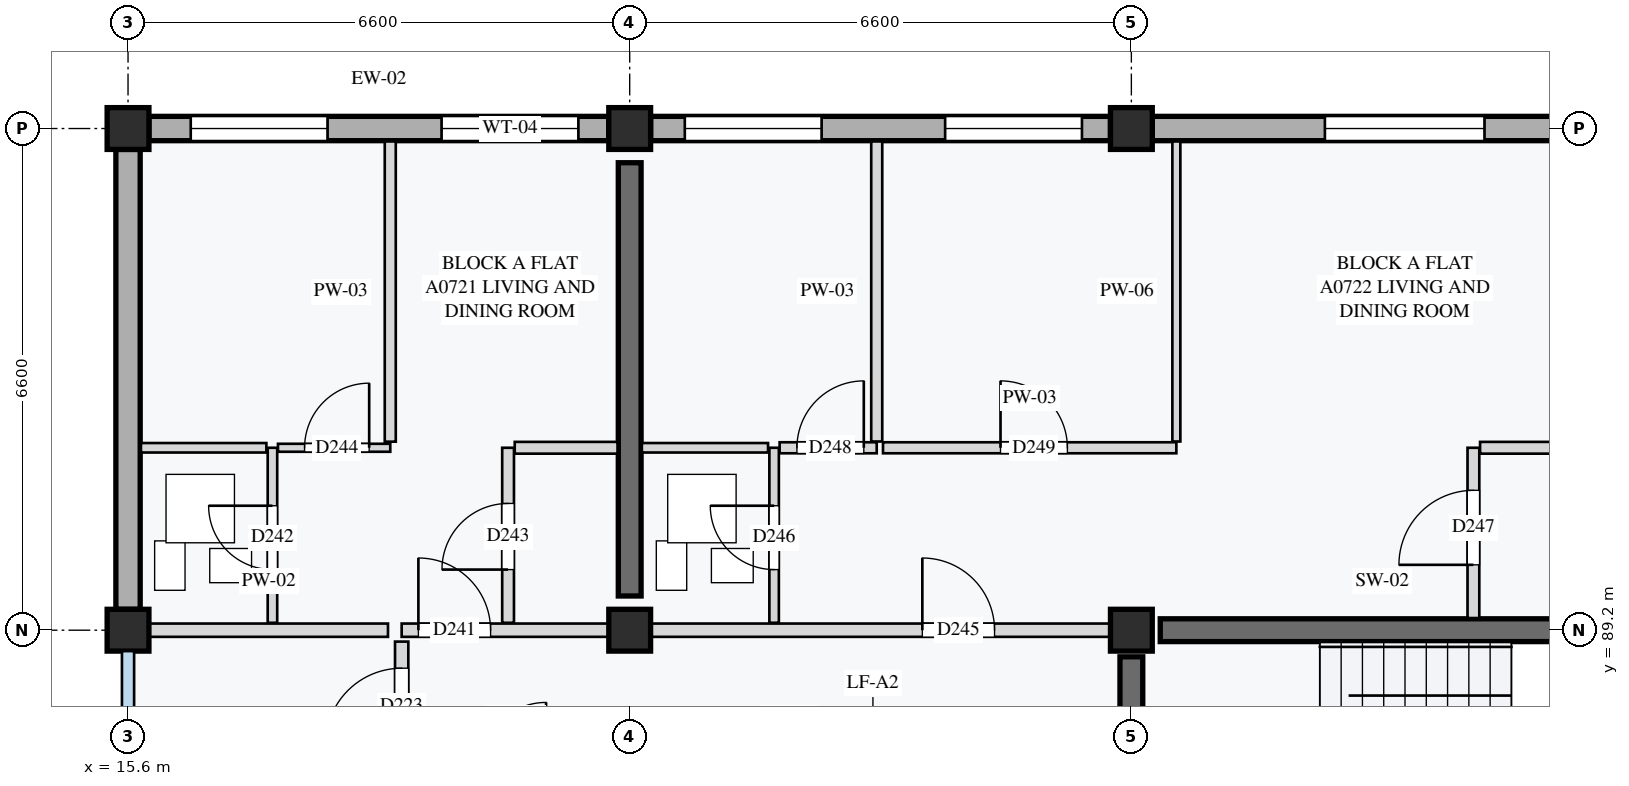
"""IFC4 building model, lengths in metres.
Left out: names, types, materials, properties, quantities, classifications, styles, units other than length and angle.
Written with IfcOpenShell. Run it as: python <this file> out.ifc"""

import sys

from ifc_helpers import new_model, si_unit, direction, frame, frame_2d, origin, origin_2d, place, context, subcontext, project, spatial, rectangle, extrude, element, fill, save


model = new_model("IFC4")
c1 = context("Model", 3, precision=1e-05, world=origin(), true_north=direction((0.0, 1.0)))
c2 = subcontext(c1, "Body", "Model", "MODEL_VIEW")
j1 = project(units=[si_unit("LENGTHUNIT", "METRE"), si_unit("PLANEANGLEUNIT", "RADIAN")], contexts=[c1])
p1 = place(None, origin())
s1 = spatial("IfcSite", under=j1, at=p1, CompositionType="ELEMENT")
p2 = place(p1, origin())
s2 = spatial("IfcBuilding", under=s1, at=p2, CompositionType="ELEMENT")
p3 = place(p2, frame((0.0, 0.0, 24.4)))
s3 = spatial("IfcBuildingStorey", under=s2, at=p3, CompositionType="ELEMENT", Elevation=24.4)
for number, where, z_axis, x_axis in (
    (1, (15.6, 89.2, 0.0), (0.0, 0.0, 1.0), (1.0, 0.0, 0.0)),
    (2, (15.6, 95.8, 0.0), (0.0, 0.0, 1.0), (1.0, 0.0, 0.0)),
    (3, (22.2, 89.2, 0.0), (0.0, 0.0, 1.0), (1.0, 0.0, 0.0)),
    (4, (22.2, 95.8, 0.0), (0.0, 0.0, 1.0), (1.0, 0.0, 0.0)),
    (5, (28.8, 89.2, 0.0), (0.0, 0.0, 1.0), (1.0, 0.0, 0.0)),
    (6, (28.8, 95.8, 0.0), (0.0, 0.0, 1.0), (1.0, 0.0, 0.0)),
):
    element("IfcColumn", number, at=place(p3, frame(where, z_axis=z_axis, x_axis=x_axis)), inside=s3, PredefinedType="COLUMN", context=c2, shape_type="SweptSolid", body=[
        extrude(rectangle(XDim=0.55, YDim=0.55, at=origin_2d()), origin(), (0.0, 0.0, 1.0), 3.2),
    ])
p4 = place(p3, frame((29.18, 89.2, 0.0), z_axis=(0.0, 0.0, 1.0), x_axis=(1.0, 0.0, 0.0)))
e7 = element("IfcWall", 7, at=p4, inside=s3, PredefinedType="SHEAR", context=c2, shape_type="SweptSolid", body=[
    extrude(rectangle(XDim=5.84, YDim=0.3, at=frame_2d((2.92, 0.0))), origin(), (0.0, 0.0, 1.0), 2.97),
])
p5 = place(p3, frame((28.8, 86.05, 0.0), z_axis=(0.0, 0.0, 1.0), x_axis=(0.0, 1.0, 0.0)))
e8 = element("IfcWall", 8, at=p5, inside=s3, PredefinedType="SHEAR", context=c2, shape_type="SweptSolid", body=[
    extrude(rectangle(XDim=2.8, YDim=0.3, at=frame_2d((1.4, 0.0))), origin(), (0.0, 0.0, 1.0), 2.97),
])
p6 = place(p3, frame((22.2, 89.65, 0.0), z_axis=(0.0, 0.0, 1.0), x_axis=(0.0, 1.0, 0.0)))
e9 = element("IfcWall", 9, at=p6, inside=s3, PredefinedType="SHEAR", context=c2, shape_type="SweptSolid", body=[
    extrude(rectangle(XDim=5.7, YDim=0.3, at=frame_2d((2.85, 0.0))), origin(), (0.0, 0.0, 1.0), 2.97),
])
p7 = place(p3, frame((15.875, 95.8, 0.0), z_axis=(0.0, 0.0, 1.0), x_axis=(1.0, 0.0, 0.0)))
e10 = element("IfcWall", 10, at=p7, inside=s3, PredefinedType="STANDARD", context=c2, shape_type="SweptSolid", body=[
    extrude(rectangle(XDim=6.05, YDim=0.32, at=frame_2d((3.025, 0.0))), origin(), (0.0, 0.0, 1.0), 2.6),
])
p8 = place(p7, frame((0.55, 0.0, 0.85)))
e11 = element("IfcOpeningElement", 11, at=p8, cuts=e10, PredefinedType="OPENING", context=c2, shape_type="SweptSolid", body=[
    extrude(rectangle(XDim=1.8, YDim=1.35, at=frame_2d((0.9, 0.675))), frame((0.0, 0.17, 0.0), z_axis=(0.0, -1.0, 0.0), x_axis=(1.0, 0.0, 0.0)), (0.0, 0.0, 1.0), 0.34),
])
p9 = place(p7, frame((3.85, 0.0, 0.85)))
e12 = element("IfcOpeningElement", 12, at=p9, cuts=e10, PredefinedType="OPENING", context=c2, shape_type="SweptSolid", body=[
    extrude(rectangle(XDim=1.8, YDim=1.55, at=frame_2d((0.9, 0.775))), frame((0.0, 0.17, 0.0), z_axis=(0.0, -1.0, 0.0), x_axis=(1.0, 0.0, 0.0)), (0.0, 0.0, 1.0), 0.34),
])
p10 = place(p3, frame((22.475, 95.8, 0.0), z_axis=(0.0, 0.0, 1.0), x_axis=(1.0, 0.0, 0.0)))
e13 = element("IfcWall", 13, at=p10, inside=s3, PredefinedType="STANDARD", context=c2, shape_type="SweptSolid", body=[
    extrude(rectangle(XDim=6.05, YDim=0.32, at=frame_2d((3.025, 0.0))), origin(), (0.0, 0.0, 1.0), 2.6),
])
p11 = place(p10, frame((0.45, 0.0, 0.85)))
e14 = element("IfcOpeningElement", 14, at=p11, cuts=e13, PredefinedType="OPENING", context=c2, shape_type="SweptSolid", body=[
    extrude(rectangle(XDim=1.8, YDim=1.35, at=frame_2d((0.9, 0.675))), frame((0.0, 0.17, 0.0), z_axis=(0.0, -1.0, 0.0), x_axis=(1.0, 0.0, 0.0)), (0.0, 0.0, 1.0), 0.34),
])
p12 = place(p10, frame((3.875, 0.0, 0.85)))
e15 = element("IfcOpeningElement", 15, at=p12, cuts=e13, PredefinedType="OPENING", context=c2, shape_type="SweptSolid", body=[
    extrude(rectangle(XDim=1.8, YDim=1.35, at=frame_2d((0.9, 0.675))), frame((0.0, 0.17, 0.0), z_axis=(0.0, -1.0, 0.0), x_axis=(1.0, 0.0, 0.0)), (0.0, 0.0, 1.0), 0.34),
])
p13 = place(p3, frame((29.075, 95.8, 0.0), z_axis=(0.0, 0.0, 1.0), x_axis=(1.0, 0.0, 0.0)))
e16 = element("IfcWall", 16, at=p13, inside=s3, PredefinedType="STANDARD", context=c2, shape_type="SweptSolid", body=[
    extrude(rectangle(XDim=6.05, YDim=0.32, at=frame_2d((3.025, 0.0))), origin(), (0.0, 0.0, 1.0), 2.6),
])
p14 = place(p13, frame((2.271, 0.0, 0.85)))
e17 = element("IfcOpeningElement", 17, at=p14, cuts=e16, PredefinedType="OPENING", context=c2, shape_type="SweptSolid", body=[
    extrude(rectangle(XDim=2.1, YDim=1.55, at=frame_2d((1.05, 0.775))), frame((0.0, 0.17, 0.0), z_axis=(0.0, -1.0, 0.0), x_axis=(1.0, 0.0, 0.0)), (0.0, 0.0, 1.0), 0.34),
])
p15 = place(p3, frame((15.6, 89.475, 0.0), z_axis=(0.0, 0.0, 1.0), x_axis=(0.0, 1.0, 0.0)))
e18 = element("IfcWall", 18, at=p15, inside=s3, PredefinedType="STANDARD", context=c2, shape_type="SweptSolid", body=[
    extrude(rectangle(XDim=6.05, YDim=0.32, at=frame_2d((3.025, 0.0))), origin(), (0.0, 0.0, 1.0), 2.65),
])
p16 = place(p3, frame((19.2, 86.05, 0.0), z_axis=(0.0, 0.0, 1.0), x_axis=(0.0, 1.0, 0.0)))
e19 = element("IfcWall", 19, at=p16, inside=s3, PredefinedType="PARTITIONING", context=c2, shape_type="SweptSolid", body=[
    extrude(rectangle(XDim=3.0, YDim=0.175, at=frame_2d((1.5, 0.0))), origin(), (0.0, 0.0, 1.0), 2.97),
])
p17 = place(p16, frame((1.65, 0.0, 0.0)))
e20 = element("IfcOpeningElement", 20, at=p17, cuts=e19, PredefinedType="OPENING", context=c2, shape_type="SweptSolid", body=[
    extrude(rectangle(XDim=1.0, YDim=2.16, at=frame_2d((0.5, 1.08))), frame((0.0, 0.097, 0.0), z_axis=(0.0, -1.0, 0.0), x_axis=(1.0, 0.0, 0.0)), (0.0, 0.0, 1.0), 0.195),
])
p18 = place(p3, frame((15.88, 89.2, 0.0), z_axis=(0.0, 0.0, 1.0), x_axis=(1.0, 0.0, 0.0)))
e21 = element("IfcWall", 21, at=p18, inside=s3, PredefinedType="PARTITIONING", context=c2, shape_type="SweptSolid", body=[
    extrude(rectangle(XDim=3.14, YDim=0.175, at=frame_2d((1.57, 0.0))), origin(), (0.0, 0.0, 1.0), 2.7),
])
p19 = place(p3, frame((19.2, 89.2, 0.0), z_axis=(0.0, 0.0, 1.0), x_axis=(1.0, 0.0, 0.0)))
e22 = element("IfcWall", 22, at=p19, inside=s3, PredefinedType="PARTITIONING", context=c2, shape_type="SweptSolid", body=[
    extrude(rectangle(XDim=3.0, YDim=0.175, at=frame_2d((1.5, 0.0))), origin(), (0.0, 0.0, 1.0), 2.7),
])
p20 = place(p19, frame((0.22, 0.0, 0.0)))
e23 = element("IfcOpeningElement", 23, at=p20, cuts=e22, PredefinedType="OPENING", context=c2, shape_type="SweptSolid", body=[
    extrude(rectangle(XDim=0.95, YDim=2.16, at=frame_2d((0.475, 1.08))), frame((0.0, 0.097, 0.0), z_axis=(0.0, -1.0, 0.0), x_axis=(1.0, 0.0, 0.0)), (0.0, 0.0, 1.0), 0.195),
])
p21 = place(p3, frame((17.5, 89.298, 0.0), z_axis=(0.0, 0.0, 1.0), x_axis=(0.0, 1.0, 0.0)))
e24 = element("IfcWall", 24, at=p21, inside=s3, PredefinedType="PARTITIONING", context=c2, shape_type="SweptSolid", body=[
    extrude(rectangle(XDim=2.302, YDim=0.125, at=frame_2d((1.151, 0.0))), origin(), (0.0, 0.0, 1.0), 2.97),
])
p22 = place(p21, frame((0.7, 0.0, 0.0)))
e25 = element("IfcOpeningElement", 25, at=p22, cuts=e24, PredefinedType="OPENING", context=c2, shape_type="SweptSolid", body=[
    extrude(rectangle(XDim=0.84, YDim=2.06, at=frame_2d((0.42, 1.03))), frame((0.0, 0.073, 0.0), z_axis=(0.0, -1.0, 0.0), x_axis=(1.0, 0.0, 0.0)), (0.0, 0.0, 1.0), 0.145),
])
p23 = place(p3, frame((15.77, 91.6, 0.0), z_axis=(0.0, 0.0, 1.0), x_axis=(1.0, 0.0, 0.0)))
e26 = element("IfcWall", 26, at=p23, inside=s3, PredefinedType="PARTITIONING", context=c2, shape_type="SweptSolid", body=[
    extrude(rectangle(XDim=1.65, YDim=0.125, at=frame_2d((0.825, 0.0))), origin(), (0.0, 0.0, 1.0), 2.97),
])
p24 = place(p3, frame((20.6, 89.298, 0.0), z_axis=(0.0, 0.0, 1.0), x_axis=(0.0, 1.0, 0.0)))
e27 = element("IfcWall", 27, at=p24, inside=s3, PredefinedType="PARTITIONING", context=c2, shape_type="SweptSolid", body=[
    extrude(rectangle(XDim=2.302, YDim=0.155, at=frame_2d((1.151, 0.0))), origin(), (0.0, 0.0, 1.0), 2.97),
])
p25 = place(p24, frame((0.7, 0.0, 0.0)))
e28 = element("IfcOpeningElement", 28, at=p25, cuts=e27, PredefinedType="OPENING", context=c2, shape_type="SweptSolid", body=[
    extrude(rectangle(XDim=0.87, YDim=2.08, at=frame_2d((0.435, 1.04))), frame((0.0, 0.087, 0.0), z_axis=(0.0, -1.0, 0.0), x_axis=(1.0, 0.0, 0.0)), (0.0, 0.0, 1.0), 0.175),
])
p26 = place(p3, frame((20.688, 91.6, 0.0), z_axis=(0.0, 0.0, 1.0), x_axis=(1.0, 0.0, 0.0)))
e29 = element("IfcWall", 29, at=p26, inside=s3, PredefinedType="PARTITIONING", context=c2, shape_type="SweptSolid", body=[
    extrude(rectangle(XDim=1.353, YDim=0.155, at=frame_2d((0.676, 0.0))), origin(), (0.0, 0.0, 1.0), 2.97),
])
p27 = place(p3, frame((17.573, 91.6, 0.0), z_axis=(0.0, 0.0, 1.0), x_axis=(1.0, 0.0, 0.0)))
e30 = element("IfcWall", 30, at=p27, inside=s3, PredefinedType="PARTITIONING", context=c2, shape_type="SweptSolid", body=[
    extrude(rectangle(XDim=1.478, YDim=0.105, at=frame_2d((0.739, 0.0))), origin(), (0.0, 0.0, 1.0), 2.97),
])
p28 = place(p27, frame((0.35, 0.0, 0.0)))
e31 = element("IfcOpeningElement", 31, at=p28, cuts=e30, PredefinedType="OPENING", context=c2, shape_type="SweptSolid", body=[
    extrude(rectangle(XDim=0.85, YDim=2.1, at=frame_2d((0.425, 1.05))), frame((0.0, 0.062, 0.0), z_axis=(0.0, -1.0, 0.0), x_axis=(1.0, 0.0, 0.0)), (0.0, 0.0, 1.0), 0.125),
])
p29 = place(p3, frame((19.05, 91.68, 0.0), z_axis=(0.0, 0.0, 1.0), x_axis=(0.0, 1.0, 0.0)))
e32 = element("IfcWall", 32, at=p29, inside=s3, PredefinedType="PARTITIONING", context=c2, shape_type="SweptSolid", body=[
    extrude(rectangle(XDim=3.95, YDim=0.145, at=frame_2d((1.975, 0.0))), origin(), (0.0, 0.0, 1.0), 2.97),
])
p30 = place(p3, frame((22.2, 89.2, 0.0), z_axis=(0.0, 0.0, 1.0), x_axis=(1.0, 0.0, 0.0)))
e33 = element("IfcWall", 33, at=p30, inside=s3, PredefinedType="PARTITIONING", context=c2, shape_type="SweptSolid", body=[
    extrude(rectangle(XDim=6.6, YDim=0.175, at=frame_2d((3.3, 0.0))), origin(), (0.0, 0.0, 1.0), 2.7),
])
p31 = place(p30, frame((3.85, 0.0, 0.0)))
e34 = element("IfcOpeningElement", 34, at=p31, cuts=e33, PredefinedType="OPENING", context=c2, shape_type="SweptSolid", body=[
    extrude(rectangle(XDim=0.95, YDim=2.16, at=frame_2d((0.475, 1.08))), frame((0.0, 0.097, 0.0), z_axis=(0.0, -1.0, 0.0), x_axis=(1.0, 0.0, 0.0)), (0.0, 0.0, 1.0), 0.195),
])
p32 = place(p3, frame((24.1, 89.298, 0.0), z_axis=(0.0, 0.0, 1.0), x_axis=(0.0, 1.0, 0.0)))
e35 = element("IfcWall", 35, at=p32, inside=s3, PredefinedType="PARTITIONING", context=c2, shape_type="SweptSolid", body=[
    extrude(rectangle(XDim=2.302, YDim=0.125, at=frame_2d((1.151, 0.0))), origin(), (0.0, 0.0, 1.0), 2.97),
])
p33 = place(p32, frame((0.7, 0.0, 0.0)))
e36 = element("IfcOpeningElement", 36, at=p33, cuts=e35, PredefinedType="OPENING", context=c2, shape_type="SweptSolid", body=[
    extrude(rectangle(XDim=0.84, YDim=2.06, at=frame_2d((0.42, 1.03))), frame((0.0, 0.073, 0.0), z_axis=(0.0, -1.0, 0.0), x_axis=(1.0, 0.0, 0.0)), (0.0, 0.0, 1.0), 0.145),
])
p34 = place(p3, frame((22.36, 91.6, 0.0), z_axis=(0.0, 0.0, 1.0), x_axis=(1.0, 0.0, 0.0)))
e37 = element("IfcWall", 37, at=p34, inside=s3, PredefinedType="PARTITIONING", context=c2, shape_type="SweptSolid", body=[
    extrude(rectangle(XDim=1.66, YDim=0.125, at=frame_2d((0.83, 0.0))), origin(), (0.0, 0.0, 1.0), 2.97),
])
p35 = place(p3, frame((33.3, 89.36, 0.0), z_axis=(0.0, 0.0, 1.0), x_axis=(0.0, 1.0, 0.0)))
e38 = element("IfcWall", 38, at=p35, inside=s3, PredefinedType="PARTITIONING", context=c2, shape_type="SweptSolid", body=[
    extrude(rectangle(XDim=2.24, YDim=0.155, at=frame_2d((1.12, 0.0))), origin(), (0.0, 0.0, 1.0), 2.97),
])
p36 = place(p35, frame((0.7, 0.0, 0.0)))
e39 = element("IfcOpeningElement", 39, at=p36, cuts=e38, PredefinedType="OPENING", context=c2, shape_type="SweptSolid", body=[
    extrude(rectangle(XDim=0.98, YDim=2.12, at=frame_2d((0.49, 1.06))), frame((0.0, 0.087, 0.0), z_axis=(0.0, -1.0, 0.0), x_axis=(1.0, 0.0, 0.0)), (0.0, 0.0, 1.0), 0.175),
])
p37 = place(p3, frame((33.387, 91.6, 0.0), z_axis=(0.0, 0.0, 1.0), x_axis=(1.0, 0.0, 0.0)))
e40 = element("IfcWall", 40, at=p37, inside=s3, PredefinedType="PARTITIONING", context=c2, shape_type="SweptSolid", body=[
    extrude(rectangle(XDim=1.853, YDim=0.155, at=frame_2d((0.926, 0.0))), origin(), (0.0, 0.0, 1.0), 2.97),
])
p38 = place(p3, frame((24.173, 91.6, 0.0), z_axis=(0.0, 0.0, 1.0), x_axis=(1.0, 0.0, 0.0)))
e41 = element("IfcWall", 41, at=p38, inside=s3, PredefinedType="PARTITIONING", context=c2, shape_type="SweptSolid", body=[
    extrude(rectangle(XDim=1.277, YDim=0.145, at=frame_2d((0.639, 0.0))), origin(), (0.0, 0.0, 1.0), 2.97),
])
p39 = place(p38, frame((0.228, 0.0, 0.0)))
e42 = element("IfcOpeningElement", 42, at=p39, cuts=e41, PredefinedType="OPENING", context=c2, shape_type="SweptSolid", body=[
    extrude(rectangle(XDim=0.88, YDim=2.1, at=frame_2d((0.44, 1.05))), frame((0.0, 0.083, 0.0), z_axis=(0.0, -1.0, 0.0), x_axis=(1.0, 0.0, 0.0)), (0.0, 0.0, 1.0), 0.165),
])
p40 = place(p3, frame((25.45, 91.683, 0.0), z_axis=(0.0, 0.0, 1.0), x_axis=(0.0, 1.0, 0.0)))
e43 = element("IfcWall", 43, at=p40, inside=s3, PredefinedType="PARTITIONING", context=c2, shape_type="SweptSolid", body=[
    extrude(rectangle(XDim=3.947, YDim=0.145, at=frame_2d((1.974, 0.0))), origin(), (0.0, 0.0, 1.0), 2.97),
])
p41 = place(p3, frame((25.532, 91.6, 0.0), z_axis=(0.0, 0.0, 1.0), x_axis=(1.0, 0.0, 0.0)))
e44 = element("IfcWall", 44, at=p41, inside=s3, PredefinedType="PARTITIONING", context=c2, shape_type="SweptSolid", body=[
    extrude(rectangle(XDim=3.86, YDim=0.145, at=frame_2d((1.93, 0.0))), origin(), (0.0, 0.0, 1.0), 2.97),
])
p42 = place(p41, frame((1.546, 0.0, 0.0)))
e45 = element("IfcOpeningElement", 45, at=p42, cuts=e44, PredefinedType="OPENING", context=c2, shape_type="SweptSolid", body=[
    extrude(rectangle(XDim=0.88, YDim=2.16, at=frame_2d((0.44, 1.08))), frame((0.0, 0.083, 0.0), z_axis=(0.0, -1.0, 0.0), x_axis=(1.0, 0.0, 0.0)), (0.0, 0.0, 1.0), 0.165),
])
p43 = place(p3, frame((29.392, 91.683, 0.0), z_axis=(0.0, 0.0, 1.0), x_axis=(0.0, 1.0, 0.0)))
e46 = element("IfcWall", 46, at=p43, inside=s3, PredefinedType="PARTITIONING", context=c2, shape_type="SweptSolid", body=[
    extrude(rectangle(XDim=3.947, YDim=0.105, at=frame_2d((1.974, 0.0))), origin(), (0.0, 0.0, 1.0), 2.97),
])
p44 = place(p8, origin())
e47 = element("IfcWindow", 47, at=p44, inside=s3, PartitioningType="SINGLE_PANEL", PredefinedType="WINDOW", context=c2, shape_type="SweptSolid", body=[
    extrude(rectangle(XDim=1.8, YDim=1.35, at=frame_2d((0.9, 0.675))), frame((0.0, 0.03, 0.0), z_axis=(0.0, -1.0, 0.0), x_axis=(1.0, 0.0, 0.0)), (0.0, 0.0, 1.0), 0.06),
])
fill(e11, e47)
p45 = place(p9, origin())
e48 = element("IfcWindow", 48, at=p45, inside=s3, PartitioningType="SINGLE_PANEL", PredefinedType="WINDOW", context=c2, shape_type="SweptSolid", body=[
    extrude(rectangle(XDim=1.8, YDim=1.55, at=frame_2d((0.9, 0.775))), frame((0.0, 0.03, 0.0), z_axis=(0.0, -1.0, 0.0), x_axis=(1.0, 0.0, 0.0)), (0.0, 0.0, 1.0), 0.06),
])
fill(e12, e48)
p46 = place(p11, origin())
e49 = element("IfcWindow", 49, at=p46, inside=s3, PartitioningType="SINGLE_PANEL", PredefinedType="WINDOW", context=c2, shape_type="SweptSolid", body=[
    extrude(rectangle(XDim=1.8, YDim=1.35, at=frame_2d((0.9, 0.675))), frame((0.0, 0.03, 0.0), z_axis=(0.0, -1.0, 0.0), x_axis=(1.0, 0.0, 0.0)), (0.0, 0.0, 1.0), 0.06),
])
fill(e14, e49)
p47 = place(p12, origin())
e50 = element("IfcWindow", 50, at=p47, inside=s3, PartitioningType="SINGLE_PANEL", PredefinedType="WINDOW", context=c2, shape_type="SweptSolid", body=[
    extrude(rectangle(XDim=1.8, YDim=1.35, at=frame_2d((0.9, 0.675))), frame((0.0, 0.03, 0.0), z_axis=(0.0, -1.0, 0.0), x_axis=(1.0, 0.0, 0.0)), (0.0, 0.0, 1.0), 0.06),
])
fill(e15, e50)
p48 = place(p14, origin())
e51 = element("IfcWindow", 51, at=p48, inside=s3, PartitioningType="SINGLE_PANEL", PredefinedType="WINDOW", context=c2, shape_type="SweptSolid", body=[
    extrude(rectangle(XDim=2.1, YDim=1.55, at=frame_2d((1.05, 0.775))), frame((0.0, 0.03, 0.0), z_axis=(0.0, -1.0, 0.0), x_axis=(1.0, 0.0, 0.0)), (0.0, 0.0, 1.0), 0.06),
])
fill(e17, e51)
p49 = place(p17, origin())
e52 = element("IfcDoor", 52, at=p49, inside=s3, OperationType="SINGLE_SWING_LEFT", PredefinedType="DOOR", context=c2, shape_type="SweptSolid", body=[
    extrude(rectangle(XDim=1.0, YDim=2.16, at=frame_2d((0.5, 1.08))), frame((0.0, 0.025, 0.0), z_axis=(0.0, -1.0, 0.0), x_axis=(1.0, 0.0, 0.0)), (0.0, 0.0, 1.0), 0.05),
])
fill(e20, e52)
p50 = place(p20, origin())
e53 = element("IfcDoor", 53, at=p50, inside=s3, OperationType="SINGLE_SWING_LEFT", PredefinedType="DOOR", context=c2, shape_type="SweptSolid", body=[
    extrude(rectangle(XDim=0.95, YDim=2.16, at=frame_2d((0.475, 1.08))), frame((0.0, 0.025, 0.0), z_axis=(0.0, -1.0, 0.0), x_axis=(1.0, 0.0, 0.0)), (0.0, 0.0, 1.0), 0.05),
])
fill(e23, e53)
p51 = place(p22, origin())
e54 = element("IfcDoor", 54, at=p51, inside=s3, OperationType="SINGLE_SWING_RIGHT", PredefinedType="DOOR", context=c2, shape_type="SweptSolid", body=[
    extrude(rectangle(XDim=0.84, YDim=2.06, at=frame_2d((0.42, 1.03))), frame((0.0, 0.025, 0.0), z_axis=(0.0, -1.0, 0.0), x_axis=(1.0, 0.0, 0.0)), (0.0, 0.0, 1.0), 0.05),
])
fill(e25, e54)
p52 = place(p25, origin())
e55 = element("IfcDoor", 55, at=p52, inside=s3, OperationType="SINGLE_SWING_LEFT", PredefinedType="DOOR", context=c2, shape_type="SweptSolid", body=[
    extrude(rectangle(XDim=0.87, YDim=2.08, at=frame_2d((0.435, 1.04))), frame((0.0, 0.025, 0.0), z_axis=(0.0, -1.0, 0.0), x_axis=(1.0, 0.0, 0.0)), (0.0, 0.0, 1.0), 0.05),
])
fill(e28, e55)
p53 = place(p28, origin())
e56 = element("IfcDoor", 56, at=p53, inside=s3, OperationType="SINGLE_SWING_RIGHT", PredefinedType="DOOR", context=c2, shape_type="SweptSolid", body=[
    extrude(rectangle(XDim=0.85, YDim=2.1, at=frame_2d((0.425, 1.05))), frame((0.0, 0.025, 0.0), z_axis=(0.0, -1.0, 0.0), x_axis=(1.0, 0.0, 0.0)), (0.0, 0.0, 1.0), 0.05),
])
fill(e31, e56)
p54 = place(p31, origin())
e57 = element("IfcDoor", 57, at=p54, inside=s3, OperationType="SINGLE_SWING_LEFT", PredefinedType="DOOR", context=c2, shape_type="SweptSolid", body=[
    extrude(rectangle(XDim=0.95, YDim=2.16, at=frame_2d((0.475, 1.08))), frame((0.0, 0.025, 0.0), z_axis=(0.0, -1.0, 0.0), x_axis=(1.0, 0.0, 0.0)), (0.0, 0.0, 1.0), 0.05),
])
fill(e34, e57)
p55 = place(p33, origin())
e58 = element("IfcDoor", 58, at=p55, inside=s3, OperationType="SINGLE_SWING_RIGHT", PredefinedType="DOOR", context=c2, shape_type="SweptSolid", body=[
    extrude(rectangle(XDim=0.84, YDim=2.06, at=frame_2d((0.42, 1.03))), frame((0.0, 0.025, 0.0), z_axis=(0.0, -1.0, 0.0), x_axis=(1.0, 0.0, 0.0)), (0.0, 0.0, 1.0), 0.05),
])
fill(e36, e58)
p56 = place(p36, origin())
e59 = element("IfcDoor", 59, at=p56, inside=s3, OperationType="SINGLE_SWING_LEFT", PredefinedType="DOOR", context=c2, shape_type="SweptSolid", body=[
    extrude(rectangle(XDim=0.98, YDim=2.12, at=frame_2d((0.49, 1.06))), frame((0.0, 0.025, 0.0), z_axis=(0.0, -1.0, 0.0), x_axis=(1.0, 0.0, 0.0)), (0.0, 0.0, 1.0), 0.05),
])
fill(e39, e59)
p57 = place(p39, origin())
e60 = element("IfcDoor", 60, at=p57, inside=s3, OperationType="SINGLE_SWING_RIGHT", PredefinedType="DOOR", context=c2, shape_type="SweptSolid", body=[
    extrude(rectangle(XDim=0.88, YDim=2.1, at=frame_2d((0.44, 1.05))), frame((0.0, 0.025, 0.0), z_axis=(0.0, -1.0, 0.0), x_axis=(1.0, 0.0, 0.0)), (0.0, 0.0, 1.0), 0.05),
])
fill(e42, e60)
p58 = place(p42, origin())
e61 = element("IfcDoor", 61, at=p58, inside=s3, OperationType="SINGLE_SWING_LEFT", PredefinedType="DOOR", context=c2, shape_type="SweptSolid", body=[
    extrude(rectangle(XDim=0.88, YDim=2.16, at=frame_2d((0.44, 1.08))), frame((0.0, 0.025, 0.0), z_axis=(0.0, -1.0, 0.0), x_axis=(1.0, 0.0, 0.0)), (0.0, 0.0, 1.0), 0.05),
])
fill(e45, e61)
save(model, sys.argv[1])
